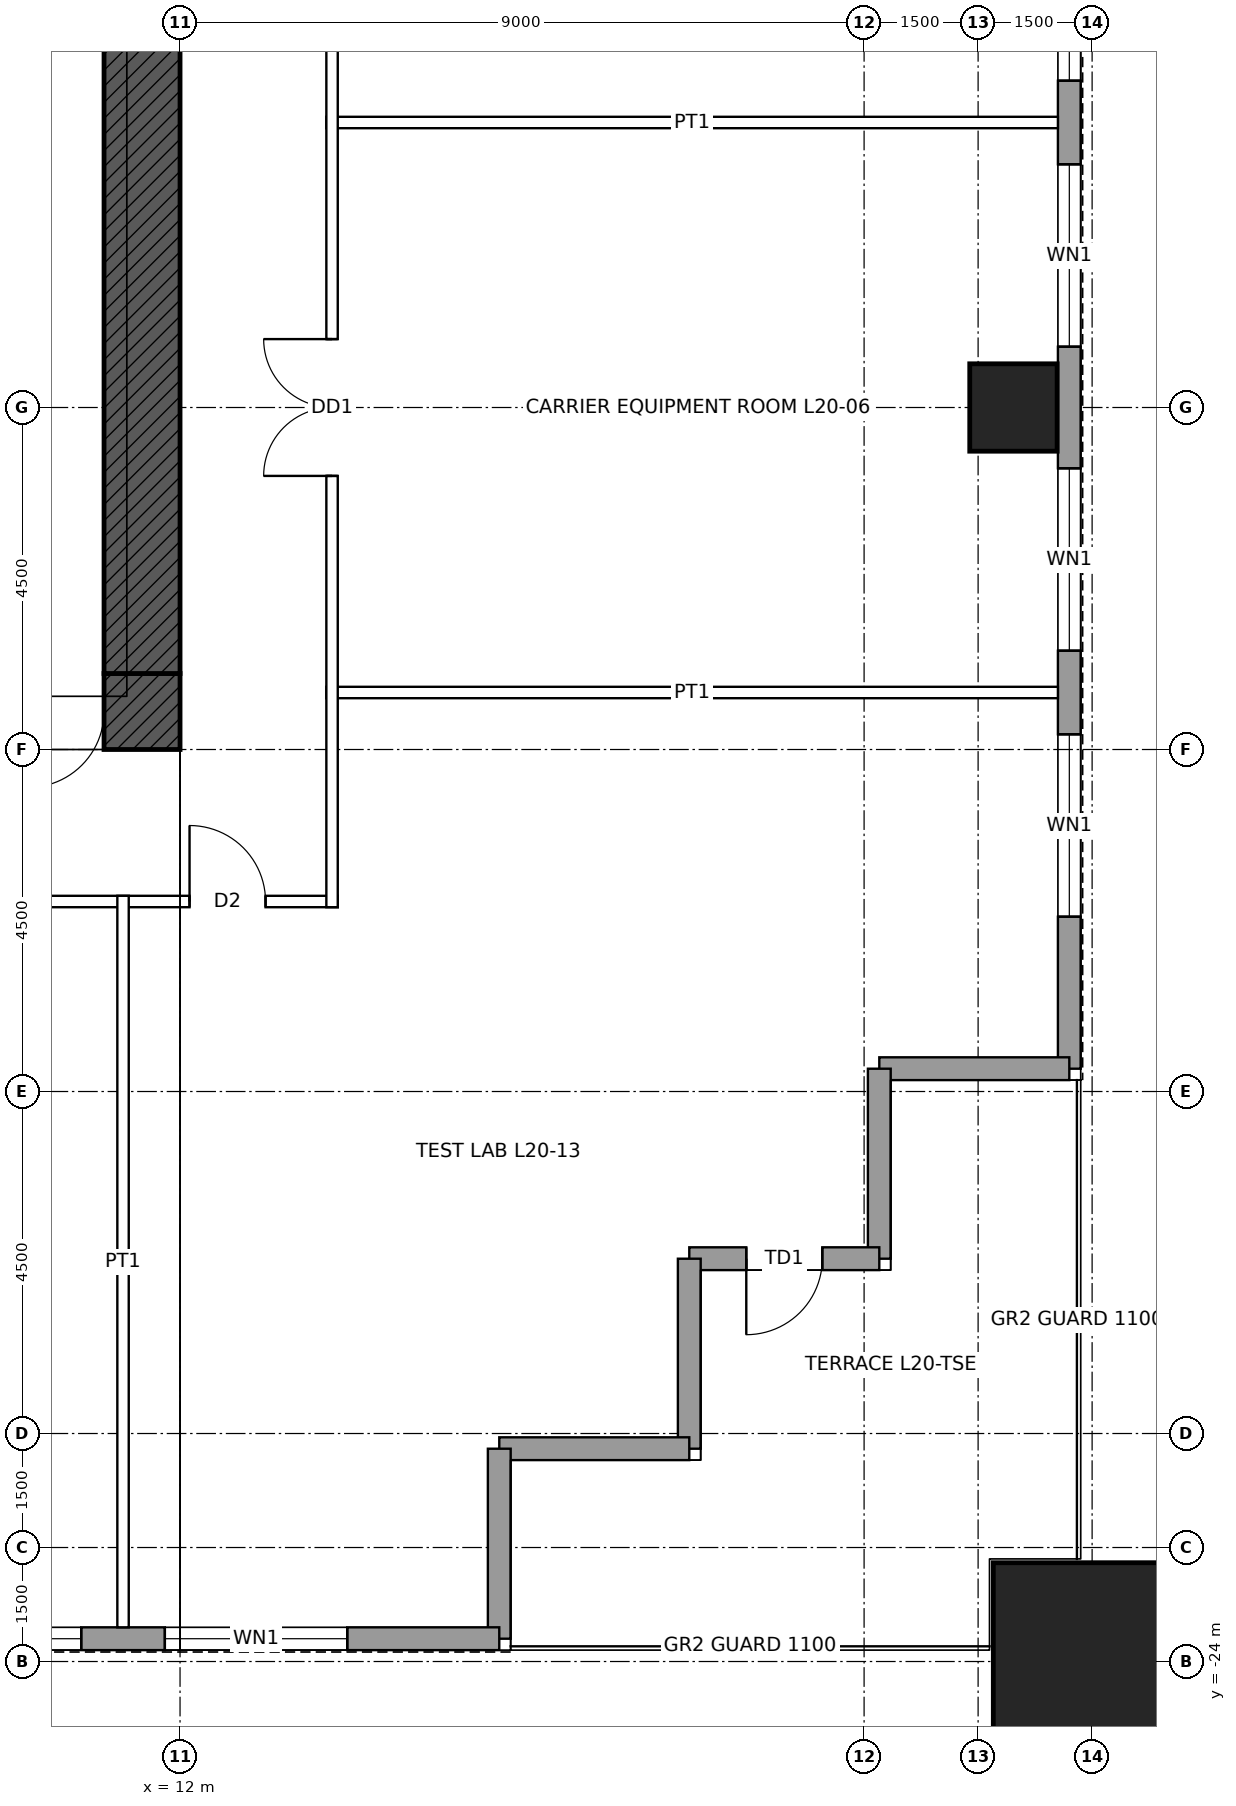
"""IFC4 building model, lengths in metres.
Left out: names, types, materials, properties, quantities, classifications, styles, units other than length and angle.
Written with IfcOpenShell. Run it as: python <this file> out.ifc"""

import sys

from ifc_helpers import new_model, si_unit, direction, frame, frame_2d, origin, origin_2d, place, context, subcontext, project, spatial, rectangle, hollow_rectangle, extrude, element, fill, save


model = new_model("IFC4")
c1 = context("Model", 3, precision=1e-05, world=origin(), true_north=direction((0.0, 1.0)))
c2 = subcontext(c1, "Body", "Model", "MODEL_VIEW")
j1 = project(units=[si_unit("LENGTHUNIT", "METRE"), si_unit("PLANEANGLEUNIT", "RADIAN")], contexts=[c1])
p1 = place(None, origin())
s1 = spatial("IfcSite", under=j1, at=p1, CompositionType="ELEMENT")
p2 = place(p1, origin())
s2 = spatial("IfcBuilding", under=s1, at=p2, CompositionType="ELEMENT")
p3 = place(p2, frame((0.0, 0.0, 104.4)))
s3 = spatial("IfcBuildingStorey", under=s2, at=p3, CompositionType="ELEMENT", Elevation=104.4)
p4 = place(p3, frame((24.0, -24.0, 0.0), z_axis=(0.0, 0.0, 1.0), x_axis=(1.0, 0.0, 0.0)))
e1 = element("IfcColumn", 1, at=p4, inside=s3, PredefinedType="COLUMN", context=c2, shape_type="SweptSolid", body=[
    extrude(hollow_rectangle(XDim=2.6, YDim=2.6, WallThickness=0.13, at=origin_2d()), origin(), (0.0, 0.0, 1.0), 4.5),
])
p5 = place(p3, frame((22.965, -7.5, 0.0), z_axis=(0.0, 0.0, 1.0), x_axis=(1.0, 0.0, 0.0)))
e2 = element("IfcColumn", 2, at=p5, inside=s3, PredefinedType="COLUMN", context=c2, shape_type="SweptSolid", body=[
    extrude(hollow_rectangle(XDim=1.15, YDim=1.15, WallThickness=0.075, at=origin_2d()), origin(), (0.0, 0.0, 1.0), 4.5),
])
p6 = place(p3, frame((12.0, -11.5, 0.0), z_axis=(0.0, 0.0, 1.0), x_axis=(-1.0, 0.0, 0.0)))
e3 = element("IfcWall", 3, at=p6, inside=s3, PredefinedType="SHEAR", context=c2, shape_type="SweptSolid", body=[
    extrude(rectangle(XDim=24.0, YDim=1.0, at=frame_2d((12.0, 0.0))), origin(), (0.0, 0.0, 1.0), 4.5),
])
p7 = place(p6, frame((11.5, 0.0, 0.0)))
e4 = element("IfcOpeningElement", 4, at=p7, cuts=e3, PredefinedType="OPENING", context=c2, shape_type="SweptSolid", body=[
    extrude(rectangle(XDim=1.0, YDim=2.1, at=frame_2d((0.5, 1.05))), frame((0.0, 0.51, 0.0), z_axis=(0.0, -1.0, 0.0), x_axis=(1.0, 0.0, 0.0)), (0.0, 0.0, 1.0), 1.02),
])
p8 = place(p6, frame((1.0, 0.0, 0.0)))
e5 = element("IfcOpeningElement", 5, at=p8, cuts=e3, PredefinedType="OPENING", context=c2, shape_type="SweptSolid", body=[
    extrude(rectangle(XDim=1.0, YDim=2.4, at=frame_2d((0.5, 1.2))), frame((0.0, 0.51, 0.0), z_axis=(0.0, -1.0, 0.0), x_axis=(1.0, 0.0, 0.0)), (0.0, 0.0, 1.0), 1.02),
])
p9 = place(p3, frame((11.5, 11.0, 0.0), z_axis=(0.0, 0.0, 1.0), x_axis=(0.0, -1.0, 0.0)))
e6 = element("IfcWall", 6, at=p9, inside=s3, PredefinedType="SHEAR", context=c2, shape_type="SweptSolid", body=[
    extrude(rectangle(XDim=22.0, YDim=1.0, at=frame_2d((11.0, 0.0))), origin(), (0.0, 0.0, 1.0), 4.5),
])
p10 = place(p9, frame((10.5, 0.0, 0.0)))
e7 = element("IfcOpeningElement", 7, at=p10, cuts=e6, PredefinedType="OPENING", context=c2, shape_type="SweptSolid", body=[
    extrude(rectangle(XDim=1.0, YDim=2.4, at=frame_2d((0.5, 1.2))), frame((0.0, 0.51, 0.0), z_axis=(0.0, -1.0, 0.0), x_axis=(1.0, 0.0, 0.0)), (0.0, 0.0, 1.0), 1.02),
])
p11 = place(p3, frame((23.7, 16.2, 0.0), z_axis=(0.0, 0.0, 1.0), x_axis=(0.0, -1.0, 0.0)))
e8 = element("IfcWall", 8, at=p11, inside=s3, PredefinedType="SOLIDWALL", context=c2, shape_type="SweptSolid", body=[
    extrude(rectangle(XDim=32.4, YDim=0.3, at=frame_2d((16.2, 0.0))), origin(), (0.0, 0.0, 1.0), 4.3),
])
p12 = place(p11, frame((2.0, 0.0, 1.0)))
e9 = element("IfcOpeningElement", 9, at=p12, cuts=e8, PredefinedType="OPENING", context=c2, shape_type="SweptSolid", body=[
    extrude(rectangle(XDim=2.4, YDim=1.2, at=frame_2d((1.2, 0.6))), frame((0.0, 0.16, 0.0), z_axis=(0.0, -1.0, 0.0), x_axis=(1.0, 0.0, 0.0)), (0.0, 0.0, 1.0), 0.32),
])
p13 = place(p11, frame((5.5, 0.0, 1.0)))
e10 = element("IfcOpeningElement", 10, at=p13, cuts=e8, PredefinedType="OPENING", context=c2, shape_type="SweptSolid", body=[
    extrude(rectangle(XDim=2.4, YDim=1.2, at=frame_2d((1.2, 0.6))), frame((0.0, 0.16, 0.0), z_axis=(0.0, -1.0, 0.0), x_axis=(1.0, 0.0, 0.0)), (0.0, 0.0, 1.0), 0.32),
])
p14 = place(p11, frame((9.5, 0.0, 1.0)))
e11 = element("IfcOpeningElement", 11, at=p14, cuts=e8, PredefinedType="OPENING", context=c2, shape_type="SweptSolid", body=[
    extrude(rectangle(XDim=2.4, YDim=1.2, at=frame_2d((1.2, 0.6))), frame((0.0, 0.16, 0.0), z_axis=(0.0, -1.0, 0.0), x_axis=(1.0, 0.0, 0.0)), (0.0, 0.0, 1.0), 0.32),
])
p15 = place(p11, frame((13.0, 0.0, 1.0)))
e12 = element("IfcOpeningElement", 12, at=p15, cuts=e8, PredefinedType="OPENING", context=c2, shape_type="SweptSolid", body=[
    extrude(rectangle(XDim=2.4, YDim=1.2, at=frame_2d((1.2, 0.6))), frame((0.0, 0.16, 0.0), z_axis=(0.0, -1.0, 0.0), x_axis=(1.0, 0.0, 0.0)), (0.0, 0.0, 1.0), 0.32),
])
p16 = place(p11, frame((17.0, 0.0, 1.0)))
e13 = element("IfcOpeningElement", 13, at=p16, cuts=e8, PredefinedType="OPENING", context=c2, shape_type="SweptSolid", body=[
    extrude(rectangle(XDim=2.4, YDim=1.2, at=frame_2d((1.2, 0.6))), frame((0.0, 0.16, 0.0), z_axis=(0.0, -1.0, 0.0), x_axis=(1.0, 0.0, 0.0)), (0.0, 0.0, 1.0), 0.32),
])
p17 = place(p11, frame((20.5, 0.0, 1.0)))
e14 = element("IfcOpeningElement", 14, at=p17, cuts=e8, PredefinedType="OPENING", context=c2, shape_type="SweptSolid", body=[
    extrude(rectangle(XDim=2.4, YDim=1.2, at=frame_2d((1.2, 0.6))), frame((0.0, 0.16, 0.0), z_axis=(0.0, -1.0, 0.0), x_axis=(1.0, 0.0, 0.0)), (0.0, 0.0, 1.0), 0.32),
])
p18 = place(p11, frame((24.5, 0.0, 1.0)))
e15 = element("IfcOpeningElement", 15, at=p18, cuts=e8, PredefinedType="OPENING", context=c2, shape_type="SweptSolid", body=[
    extrude(rectangle(XDim=2.4, YDim=1.2, at=frame_2d((1.2, 0.6))), frame((0.0, 0.16, 0.0), z_axis=(0.0, -1.0, 0.0), x_axis=(1.0, 0.0, 0.0)), (0.0, 0.0, 1.0), 0.32),
])
p19 = place(p11, frame((28.0, 0.0, 1.0)))
e16 = element("IfcOpeningElement", 16, at=p19, cuts=e8, PredefinedType="OPENING", context=c2, shape_type="SweptSolid", body=[
    extrude(rectangle(XDim=2.4, YDim=1.2, at=frame_2d((1.2, 0.6))), frame((0.0, 0.16, 0.0), z_axis=(0.0, -1.0, 0.0), x_axis=(1.0, 0.0, 0.0)), (0.0, 0.0, 1.0), 0.32),
])
for number, where, z_axis, x_axis in (
    (17, (23.7, -16.2, 0.0), (0.0, 0.0, 1.0), (-1.0, 0.0, 0.0)),
    (18, (21.2, -16.2, 0.0), (0.0, 0.0, 1.0), (0.0, -1.0, 0.0)),
):
    element("IfcWall", number, at=place(p3, frame(where, z_axis=z_axis, x_axis=x_axis)), inside=s3, PredefinedType="SOLIDWALL", context=c2, shape_type="SweptSolid", body=[
        extrude(rectangle(XDim=2.5, YDim=0.3, at=frame_2d((1.25, 0.0))), origin(), (0.0, 0.0, 1.0), 4.3),
    ])
p20 = place(p3, frame((21.2, -18.7, 0.0), z_axis=(0.0, 0.0, 1.0), x_axis=(-1.0, 0.0, 0.0)))
e19 = element("IfcWall", 19, at=p20, inside=s3, PredefinedType="SOLIDWALL", context=c2, shape_type="SweptSolid", body=[
    extrude(rectangle(XDim=2.5, YDim=0.3, at=frame_2d((1.25, 0.0))), origin(), (0.0, 0.0, 1.0), 4.3),
])
p21 = place(p20, frame((0.75, 0.0, 0.0)))
e20 = element("IfcOpeningElement", 20, at=p21, cuts=e19, PredefinedType="OPENING", context=c2, shape_type="SweptSolid", body=[
    extrude(rectangle(XDim=1.0, YDim=2.4, at=frame_2d((0.5, 1.2))), frame((0.0, 0.16, 0.0), z_axis=(0.0, -1.0, 0.0), x_axis=(1.0, 0.0, 0.0)), (0.0, 0.0, 1.0), 0.32),
])
for number, where, z_axis, x_axis in (
    (21, (18.7, -18.7, 0.0), (0.0, 0.0, 1.0), (0.0, -1.0, 0.0)),
    (22, (18.7, -21.2, 0.0), (0.0, 0.0, 1.0), (-1.0, 0.0, 0.0)),
    (23, (16.2, -21.2, 0.0), (0.0, 0.0, 1.0), (0.0, -1.0, 0.0)),
):
    element("IfcWall", number, at=place(p3, frame(where, z_axis=z_axis, x_axis=x_axis)), inside=s3, PredefinedType="SOLIDWALL", context=c2, shape_type="SweptSolid", body=[
        extrude(rectangle(XDim=2.5, YDim=0.3, at=frame_2d((1.25, 0.0))), origin(), (0.0, 0.0, 1.0), 4.3),
    ])
p22 = place(p3, frame((16.2, -23.7, 0.0), z_axis=(0.0, 0.0, 1.0), x_axis=(-1.0, 0.0, 0.0)))
e24 = element("IfcWall", 24, at=p22, inside=s3, PredefinedType="SOLIDWALL", context=c2, shape_type="SweptSolid", body=[
    extrude(rectangle(XDim=32.4, YDim=0.3, at=frame_2d((16.2, 0.0))), origin(), (0.0, 0.0, 1.0), 4.3),
])
p23 = place(p22, frame((2.0, 0.0, 1.0)))
e25 = element("IfcOpeningElement", 25, at=p23, cuts=e24, PredefinedType="OPENING", context=c2, shape_type="SweptSolid", body=[
    extrude(rectangle(XDim=2.4, YDim=1.2, at=frame_2d((1.2, 0.6))), frame((0.0, 0.16, 0.0), z_axis=(0.0, -1.0, 0.0), x_axis=(1.0, 0.0, 0.0)), (0.0, 0.0, 1.0), 0.32),
])
p24 = place(p22, frame((5.5, 0.0, 1.0)))
e26 = element("IfcOpeningElement", 26, at=p24, cuts=e24, PredefinedType="OPENING", context=c2, shape_type="SweptSolid", body=[
    extrude(rectangle(XDim=2.4, YDim=1.2, at=frame_2d((1.2, 0.6))), frame((0.0, 0.16, 0.0), z_axis=(0.0, -1.0, 0.0), x_axis=(1.0, 0.0, 0.0)), (0.0, 0.0, 1.0), 0.32),
])
p25 = place(p22, frame((9.5, 0.0, 1.0)))
e27 = element("IfcOpeningElement", 27, at=p25, cuts=e24, PredefinedType="OPENING", context=c2, shape_type="SweptSolid", body=[
    extrude(rectangle(XDim=2.4, YDim=1.2, at=frame_2d((1.2, 0.6))), frame((0.0, 0.16, 0.0), z_axis=(0.0, -1.0, 0.0), x_axis=(1.0, 0.0, 0.0)), (0.0, 0.0, 1.0), 0.32),
])
p26 = place(p22, frame((13.0, 0.0, 1.0)))
e28 = element("IfcOpeningElement", 28, at=p26, cuts=e24, PredefinedType="OPENING", context=c2, shape_type="SweptSolid", body=[
    extrude(rectangle(XDim=2.4, YDim=1.2, at=frame_2d((1.2, 0.6))), frame((0.0, 0.16, 0.0), z_axis=(0.0, -1.0, 0.0), x_axis=(1.0, 0.0, 0.0)), (0.0, 0.0, 1.0), 0.32),
])
p27 = place(p22, frame((17.0, 0.0, 1.0)))
e29 = element("IfcOpeningElement", 29, at=p27, cuts=e24, PredefinedType="OPENING", context=c2, shape_type="SweptSolid", body=[
    extrude(rectangle(XDim=2.4, YDim=1.2, at=frame_2d((1.2, 0.6))), frame((0.0, 0.16, 0.0), z_axis=(0.0, -1.0, 0.0), x_axis=(1.0, 0.0, 0.0)), (0.0, 0.0, 1.0), 0.32),
])
p28 = place(p22, frame((20.5, 0.0, 1.0)))
e30 = element("IfcOpeningElement", 30, at=p28, cuts=e24, PredefinedType="OPENING", context=c2, shape_type="SweptSolid", body=[
    extrude(rectangle(XDim=2.4, YDim=1.2, at=frame_2d((1.2, 0.6))), frame((0.0, 0.16, 0.0), z_axis=(0.0, -1.0, 0.0), x_axis=(1.0, 0.0, 0.0)), (0.0, 0.0, 1.0), 0.32),
])
p29 = place(p22, frame((24.5, 0.0, 1.0)))
e31 = element("IfcOpeningElement", 31, at=p29, cuts=e24, PredefinedType="OPENING", context=c2, shape_type="SweptSolid", body=[
    extrude(rectangle(XDim=2.4, YDim=1.2, at=frame_2d((1.2, 0.6))), frame((0.0, 0.16, 0.0), z_axis=(0.0, -1.0, 0.0), x_axis=(1.0, 0.0, 0.0)), (0.0, 0.0, 1.0), 0.32),
])
p30 = place(p22, frame((28.0, 0.0, 1.0)))
e32 = element("IfcOpeningElement", 32, at=p30, cuts=e24, PredefinedType="OPENING", context=c2, shape_type="SweptSolid", body=[
    extrude(rectangle(XDim=2.4, YDim=1.2, at=frame_2d((1.2, 0.6))), frame((0.0, 0.16, 0.0), z_axis=(0.0, -1.0, 0.0), x_axis=(1.0, 0.0, 0.0)), (0.0, 0.0, 1.0), 0.32),
])
p31 = place(p3, frame((-14.075, -14.0, 0.0), z_axis=(0.0, 0.0, 1.0), x_axis=(1.0, 0.0, 0.0)))
e33 = element("IfcWall", 33, at=p31, inside=s3, PredefinedType="PARTITIONING", context=c2, shape_type="SweptSolid", body=[
    extrude(rectangle(XDim=28.15, YDim=0.15, at=frame_2d((14.075, 0.0))), origin(), (0.0, 0.0, 1.0), 4.3),
])
p32 = place(p31, frame((20.675, 0.0, 0.0)))
e34 = element("IfcOpeningElement", 34, at=p32, cuts=e33, PredefinedType="OPENING", context=c2, shape_type="SweptSolid", body=[
    extrude(rectangle(XDim=1.8, YDim=2.4, at=frame_2d((0.9, 1.2))), frame((0.0, 0.085, 0.0), z_axis=(0.0, -1.0, 0.0), x_axis=(1.0, 0.0, 0.0)), (0.0, 0.0, 1.0), 0.17),
])
p33 = place(p31, frame((13.175, 0.0, 0.0)))
e35 = element("IfcOpeningElement", 35, at=p33, cuts=e33, PredefinedType="OPENING", context=c2, shape_type="SweptSolid", body=[
    extrude(rectangle(XDim=1.8, YDim=2.4, at=frame_2d((0.9, 1.2))), frame((0.0, 0.085, 0.0), z_axis=(0.0, -1.0, 0.0), x_axis=(1.0, 0.0, 0.0)), (0.0, 0.0, 1.0), 0.17),
])
p34 = place(p31, frame((5.675, 0.0, 0.0)))
e36 = element("IfcOpeningElement", 36, at=p34, cuts=e33, PredefinedType="OPENING", context=c2, shape_type="SweptSolid", body=[
    extrude(rectangle(XDim=1.8, YDim=2.4, at=frame_2d((0.9, 1.2))), frame((0.0, 0.085, 0.0), z_axis=(0.0, -1.0, 0.0), x_axis=(1.0, 0.0, 0.0)), (0.0, 0.0, 1.0), 0.17),
])
p35 = place(p31, frame((26.2, 0.0, 0.0)))
e37 = element("IfcOpeningElement", 37, at=p35, cuts=e33, PredefinedType="OPENING", context=c2, shape_type="SweptSolid", body=[
    extrude(rectangle(XDim=1.0, YDim=2.1, at=frame_2d((0.5, 1.05))), frame((0.0, 0.085, 0.0), z_axis=(0.0, -1.0, 0.0), x_axis=(1.0, 0.0, 0.0)), (0.0, 0.0, 1.0), 0.17),
])
p36 = place(p31, frame((0.95, 0.0, 0.0)))
e38 = element("IfcOpeningElement", 38, at=p36, cuts=e33, PredefinedType="OPENING", context=c2, shape_type="SweptSolid", body=[
    extrude(rectangle(XDim=1.0, YDim=2.1, at=frame_2d((0.5, 1.05))), frame((0.0, 0.085, 0.0), z_axis=(0.0, -1.0, 0.0), x_axis=(1.0, 0.0, 0.0)), (0.0, 0.0, 1.0), 0.17),
])
for number, where, z_axis, x_axis in (
    (39, (13.925, -11.25, 0.0), (0.0, 0.0, 1.0), (1.0, 0.0, 0.0)),
    (40, (13.925, -3.75, 0.0), (0.0, 0.0, 1.0), (1.0, 0.0, 0.0)),
    (41, (11.25, -23.55, 0.0), (0.0, 0.0, 1.0), (0.0, 1.0, 0.0)),
):
    element("IfcWall", number, at=place(p3, frame(where, z_axis=z_axis, x_axis=x_axis)), inside=s3, PredefinedType="PARTITIONING", context=c2, shape_type="SweptSolid", body=[
        extrude(rectangle(XDim=9.625, YDim=0.15, at=frame_2d((4.812, 0.0))), origin(), (0.0, 0.0, 1.0), 3.431),
    ])
p37 = place(p3, frame((14.0, -14.075, 0.0), z_axis=(0.0, 0.0, 1.0), x_axis=(0.0, 1.0, 0.0)))
e42 = element("IfcWall", 42, at=p37, inside=s3, PredefinedType="PARTITIONING", context=c2, shape_type="SweptSolid", body=[
    extrude(rectangle(XDim=28.15, YDim=0.15, at=frame_2d((14.075, 0.0))), origin(), (0.0, 0.0, 1.0), 4.3),
])
p38 = place(p37, frame((20.675, 0.0, 0.0)))
e43 = element("IfcOpeningElement", 43, at=p38, cuts=e42, PredefinedType="OPENING", context=c2, shape_type="SweptSolid", body=[
    extrude(rectangle(XDim=1.8, YDim=2.4, at=frame_2d((0.9, 1.2))), frame((0.0, 0.085, 0.0), z_axis=(0.0, -1.0, 0.0), x_axis=(1.0, 0.0, 0.0)), (0.0, 0.0, 1.0), 0.17),
])
p39 = place(p37, frame((13.175, 0.0, 0.0)))
e44 = element("IfcOpeningElement", 44, at=p39, cuts=e42, PredefinedType="OPENING", context=c2, shape_type="SweptSolid", body=[
    extrude(rectangle(XDim=1.8, YDim=2.4, at=frame_2d((0.9, 1.2))), frame((0.0, 0.085, 0.0), z_axis=(0.0, -1.0, 0.0), x_axis=(1.0, 0.0, 0.0)), (0.0, 0.0, 1.0), 0.17),
])
p40 = place(p37, frame((5.675, 0.0, 0.0)))
e45 = element("IfcOpeningElement", 45, at=p40, cuts=e42, PredefinedType="OPENING", context=c2, shape_type="SweptSolid", body=[
    extrude(rectangle(XDim=1.8, YDim=2.4, at=frame_2d((0.9, 1.2))), frame((0.0, 0.085, 0.0), z_axis=(0.0, -1.0, 0.0), x_axis=(1.0, 0.0, 0.0)), (0.0, 0.0, 1.0), 0.17),
])
p41 = place(p16, origin())
e46 = element("IfcWindow", 46, at=p41, inside=s3, PartitioningType="SINGLE_PANEL", PredefinedType="WINDOW", context=c2, shape_type="SweptSolid", body=[
    extrude(rectangle(XDim=2.4, YDim=1.2, at=frame_2d((1.2, 0.6))), frame((0.0, 0.03, 0.0), z_axis=(0.0, -1.0, 0.0), x_axis=(1.0, 0.0, 0.0)), (0.0, 0.0, 1.0), 0.06),
])
fill(e13, e46)
p42 = place(p17, origin())
e47 = element("IfcWindow", 47, at=p42, inside=s3, PartitioningType="SINGLE_PANEL", PredefinedType="WINDOW", context=c2, shape_type="SweptSolid", body=[
    extrude(rectangle(XDim=2.4, YDim=1.2, at=frame_2d((1.2, 0.6))), frame((0.0, 0.03, 0.0), z_axis=(0.0, -1.0, 0.0), x_axis=(1.0, 0.0, 0.0)), (0.0, 0.0, 1.0), 0.06),
])
fill(e14, e47)
p43 = place(p18, origin())
e48 = element("IfcWindow", 48, at=p43, inside=s3, PartitioningType="SINGLE_PANEL", PredefinedType="WINDOW", context=c2, shape_type="SweptSolid", body=[
    extrude(rectangle(XDim=2.4, YDim=1.2, at=frame_2d((1.2, 0.6))), frame((0.0, 0.03, 0.0), z_axis=(0.0, -1.0, 0.0), x_axis=(1.0, 0.0, 0.0)), (0.0, 0.0, 1.0), 0.06),
])
fill(e15, e48)
p44 = place(p19, origin())
e49 = element("IfcWindow", 49, at=p44, inside=s3, PartitioningType="SINGLE_PANEL", PredefinedType="WINDOW", context=c2, shape_type="SweptSolid", body=[
    extrude(rectangle(XDim=2.4, YDim=1.2, at=frame_2d((1.2, 0.6))), frame((0.0, 0.03, 0.0), z_axis=(0.0, -1.0, 0.0), x_axis=(1.0, 0.0, 0.0)), (0.0, 0.0, 1.0), 0.06),
])
fill(e16, e49)
p45 = place(p21, origin())
e50 = element("IfcDoor", 50, at=p45, inside=s3, OperationType="SINGLE_SWING_RIGHT", PredefinedType="DOOR", context=c2, shape_type="SweptSolid", body=[
    extrude(rectangle(XDim=1.0, YDim=2.4, at=frame_2d((0.5, 1.2))), frame((0.0, 0.025, 0.0), z_axis=(0.0, -1.0, 0.0), x_axis=(1.0, 0.0, 0.0)), (0.0, 0.0, 1.0), 0.05),
])
fill(e20, e50)
p46 = place(p23, origin())
e51 = element("IfcWindow", 51, at=p46, inside=s3, PartitioningType="SINGLE_PANEL", PredefinedType="WINDOW", context=c2, shape_type="SweptSolid", body=[
    extrude(rectangle(XDim=2.4, YDim=1.2, at=frame_2d((1.2, 0.6))), frame((0.0, 0.03, 0.0), z_axis=(0.0, -1.0, 0.0), x_axis=(1.0, 0.0, 0.0)), (0.0, 0.0, 1.0), 0.06),
])
fill(e25, e51)
p47 = place(p24, origin())
e52 = element("IfcWindow", 52, at=p47, inside=s3, PartitioningType="SINGLE_PANEL", PredefinedType="WINDOW", context=c2, shape_type="SweptSolid", body=[
    extrude(rectangle(XDim=2.4, YDim=1.2, at=frame_2d((1.2, 0.6))), frame((0.0, 0.03, 0.0), z_axis=(0.0, -1.0, 0.0), x_axis=(1.0, 0.0, 0.0)), (0.0, 0.0, 1.0), 0.06),
])
fill(e26, e52)
p48 = place(p8, origin())
e53 = element("IfcDoor", 53, at=p48, inside=s3, OperationType="SINGLE_SWING_RIGHT", PredefinedType="DOOR", context=c2, shape_type="SweptSolid", body=[
    extrude(rectangle(XDim=1.0, YDim=2.4, at=frame_2d((0.5, 1.2))), frame((0.0, 0.485, 0.0), z_axis=(0.0, -1.0, 0.0), x_axis=(1.0, 0.0, 0.0)), (0.0, 0.0, 1.0), 0.05),
])
fill(e5, e53)
p49 = place(p40, origin())
e54 = element("IfcDoor", 54, at=p49, inside=s3, OperationType="DOUBLE_DOOR_SINGLE_SWING", PredefinedType="DOOR", context=c2, shape_type="SweptSolid", body=[
    extrude(rectangle(XDim=1.8, YDim=2.4, at=frame_2d((0.9, 1.2))), frame((0.0, 0.025, 0.0), z_axis=(0.0, -1.0, 0.0), x_axis=(1.0, 0.0, 0.0)), (0.0, 0.0, 1.0), 0.05),
])
fill(e45, e54)
p50 = place(p35, origin())
e55 = element("IfcDoor", 55, at=p50, inside=s3, OperationType="SINGLE_SWING_LEFT", PredefinedType="DOOR", context=c2, shape_type="SweptSolid", body=[
    extrude(rectangle(XDim=1.0, YDim=2.1, at=frame_2d((0.5, 1.05))), frame((0.0, 0.025, 0.0), z_axis=(0.0, -1.0, 0.0), x_axis=(1.0, 0.0, 0.0)), (0.0, 0.0, 1.0), 0.05),
])
fill(e37, e55)
save(model, sys.argv[1])
